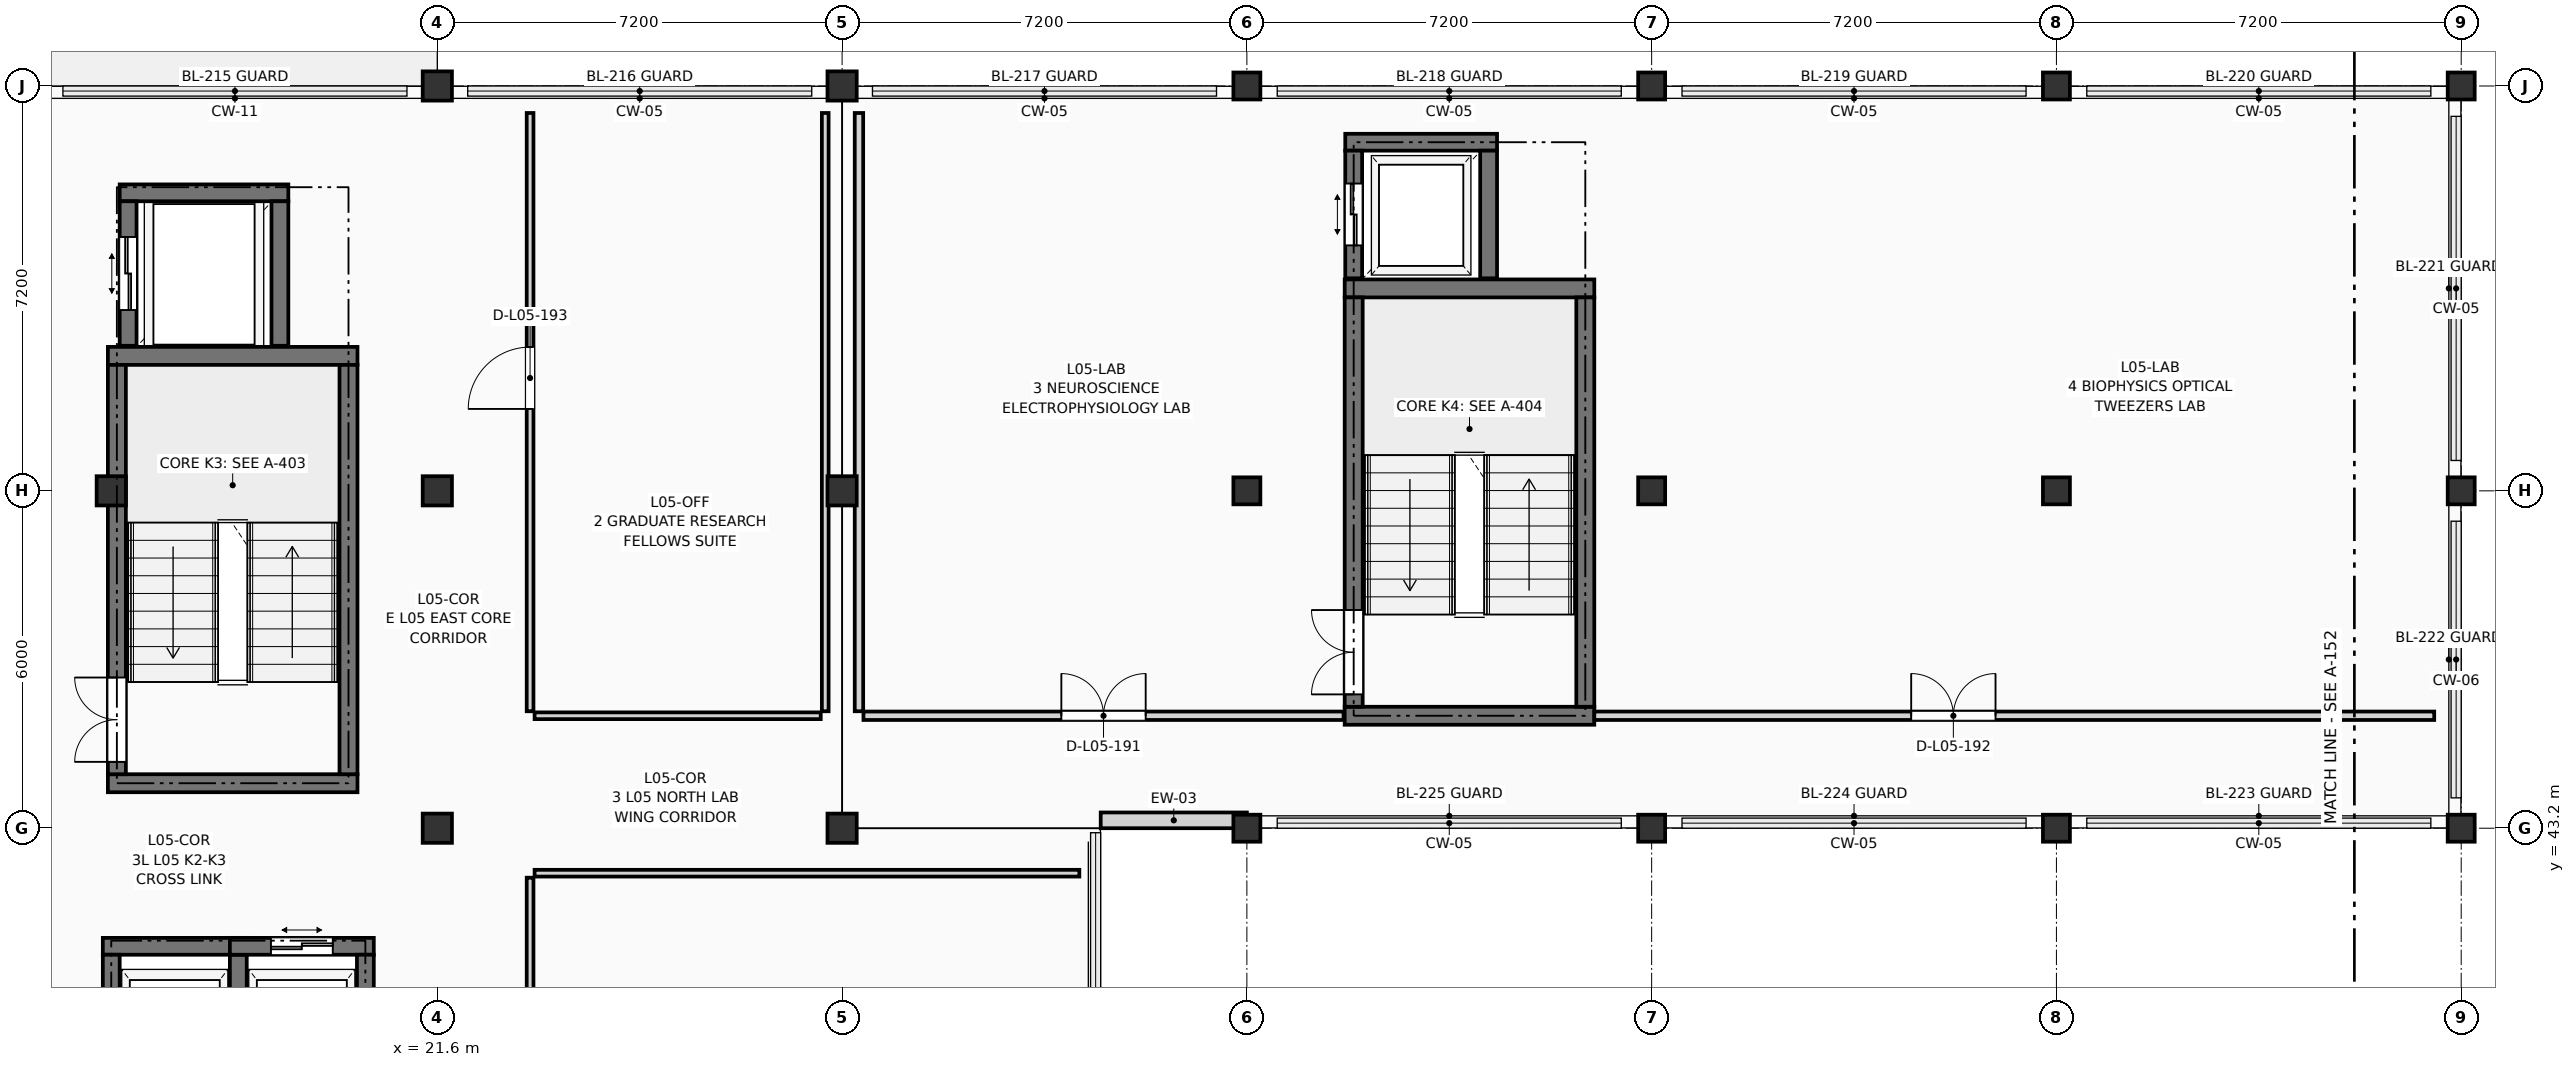
"""IFC4 building model, lengths in metres.
Left out: names, types, materials, properties, quantities, classifications, styles, units other than length and angle.
Written with IfcOpenShell. Run it as: python <this file> out.ifc"""

import sys

from ifc_helpers import new_model, si_unit, direction, frame, frame_2d, origin, origin_2d, place, context, subcontext, project, spatial, rectangle, extrude, element, fill, save


model = new_model("IFC4")
c1 = context("Model", 3, precision=1e-05, world=origin(), true_north=direction((0.0, 1.0)))
c2 = subcontext(c1, "Body", "Model", "MODEL_VIEW")
j1 = project(units=[si_unit("LENGTHUNIT", "METRE"), si_unit("PLANEANGLEUNIT", "RADIAN")], contexts=[c1])
p1 = place(None, origin())
s1 = spatial("IfcSite", under=j1, at=p1, CompositionType="ELEMENT")
p2 = place(p1, origin())
s2 = spatial("IfcBuilding", under=s1, at=p2, CompositionType="ELEMENT")
p3 = place(p2, frame((0.0, 0.0, 19.35)))
s3 = spatial("IfcBuildingStorey", under=s2, at=p3, CompositionType="ELEMENT", Elevation=19.35)
for number, where, z_axis, x_axis in (
    (1, (15.8, 49.2, 0.0), (0.0, 0.0, 1.0), (1.0, 0.0, 0.0)),
    (2, (21.6, 43.2, 0.0), (0.0, 0.0, 1.0), (1.0, 0.0, 0.0)),
    (3, (21.6, 49.2, 0.0), (0.0, 0.0, 1.0), (1.0, 0.0, 0.0)),
    (4, (21.6, 56.4, 0.0), (0.0, 0.0, 1.0), (1.0, 0.0, 0.0)),
    (5, (28.8, 43.2, 0.0), (0.0, 0.0, 1.0), (1.0, 0.0, 0.0)),
    (6, (28.8, 49.2, 0.0), (0.0, 0.0, 1.0), (1.0, 0.0, 0.0)),
    (7, (28.8, 56.4, 0.0), (0.0, 0.0, 1.0), (1.0, 0.0, 0.0)),
):
    element("IfcColumn", number, at=place(p3, frame(where, z_axis=z_axis, x_axis=x_axis)), inside=s3, PredefinedType="COLUMN", context=c2, shape_type="SweptSolid", body=[
        extrude(rectangle(XDim=0.52, YDim=0.52, at=origin_2d()), origin(), (0.0, 0.0, 1.0), 3.6),
    ])
for number, where, z_axis, x_axis in (
    (8, (36.0, 43.2, 0.0), (0.0, 0.0, 1.0), (1.0, 0.0, 0.0)),
    (9, (36.0, 49.2, 0.0), (0.0, 0.0, 1.0), (1.0, 0.0, 0.0)),
    (10, (36.0, 56.4, 0.0), (0.0, 0.0, 1.0), (1.0, 0.0, 0.0)),
    (11, (43.2, 43.2, 0.0), (0.0, 0.0, 1.0), (1.0, 0.0, 0.0)),
    (12, (43.2, 49.2, 0.0), (0.0, 0.0, 1.0), (1.0, 0.0, 0.0)),
    (13, (43.2, 56.4, 0.0), (0.0, 0.0, 1.0), (1.0, 0.0, 0.0)),
    (14, (50.4, 43.2, 0.0), (0.0, 0.0, 1.0), (1.0, 0.0, 0.0)),
    (15, (50.4, 49.2, 0.0), (0.0, 0.0, 1.0), (1.0, 0.0, 0.0)),
    (16, (50.4, 56.4, 0.0), (0.0, 0.0, 1.0), (1.0, 0.0, 0.0)),
    (17, (57.6, 43.2, 0.0), (0.0, 0.0, 1.0), (1.0, 0.0, 0.0)),
    (18, (57.6, 49.2, 0.0), (0.0, 0.0, 1.0), (1.0, 0.0, 0.0)),
    (19, (57.6, 56.4, 0.0), (0.0, 0.0, 1.0), (1.0, 0.0, 0.0)),
):
    element("IfcColumn", number, at=place(p3, frame(where, z_axis=z_axis, x_axis=x_axis)), inside=s3, PredefinedType="COLUMN", context=c2, shape_type="SweptSolid", body=[
        extrude(rectangle(XDim=0.48, YDim=0.48, at=origin_2d()), origin(), (0.0, 0.0, 1.0), 3.6),
    ])
p4 = place(p3, frame((33.4, 43.34, 0.0), z_axis=(0.0, 0.0, 1.0), x_axis=(1.0, 0.0, 0.0)))
e20 = element("IfcWall", 20, at=p4, inside=s3, PredefinedType="SOLIDWALL", context=c2, shape_type="SweptSolid", body=[
    extrude(rectangle(XDim=2.6, YDim=0.28, at=frame_2d((1.3, 0.0))), origin(), (0.0, 0.0, 1.0), 3.38),
])
for number, where, z_axis, x_axis in (
    (21, (15.74, 44.0, 0.0), (0.0, 0.0, 1.0), (1.0, 0.0, 0.0)),
    (22, (15.74, 51.6, 0.0), (0.0, 0.0, 1.0), (1.0, 0.0, 0.0)),
):
    element("IfcWall", number, at=place(p3, frame(where, z_axis=z_axis, x_axis=x_axis)), inside=s3, PredefinedType="SHEAR", context=c2, shape_type="SweptSolid", body=[
        extrude(rectangle(XDim=4.44, YDim=0.32, at=frame_2d((2.22, 0.0))), origin(), (0.0, 0.0, 1.0), 3.39),
    ])
p5 = place(p3, frame((15.9, 44.16, 0.0), z_axis=(0.0, 0.0, 1.0), x_axis=(0.0, 1.0, 0.0)))
e23 = element("IfcWall", 23, at=p5, inside=s3, PredefinedType="SHEAR", context=c2, shape_type="SweptSolid", body=[
    extrude(rectangle(XDim=7.28, YDim=0.32, at=frame_2d((3.64, 0.0))), origin(), (0.0, 0.0, 1.0), 3.39),
])
p6 = place(p5, frame((0.22, 0.0, 0.0)))
e24 = element("IfcOpeningElement", 24, at=p6, cuts=e23, PredefinedType="OPENING", context=c2, shape_type="SweptSolid", body=[
    extrude(rectangle(XDim=1.5, YDim=2.2, at=frame_2d((0.75, 1.1))), frame((0.0, 0.172, 0.0), z_axis=(0.0, -1.0, 0.0), x_axis=(1.0, 0.0, 0.0)), (0.0, 0.0, 1.0), 0.344),
])
p7 = place(p3, frame((20.02, 44.16, 0.0), z_axis=(0.0, 0.0, 1.0), x_axis=(0.0, 1.0, 0.0)))
e25 = element("IfcWall", 25, at=p7, inside=s3, PredefinedType="SHEAR", context=c2, shape_type="SweptSolid", body=[
    extrude(rectangle(XDim=7.28, YDim=0.32, at=frame_2d((3.64, 0.0))), origin(), (0.0, 0.0, 1.0), 3.39),
])
for number, where, z_axis, x_axis in (
    (26, (37.74, 45.2, 0.0), (0.0, 0.0, 1.0), (1.0, 0.0, 0.0)),
    (27, (37.74, 52.8, 0.0), (0.0, 0.0, 1.0), (1.0, 0.0, 0.0)),
):
    element("IfcWall", number, at=place(p3, frame(where, z_axis=z_axis, x_axis=x_axis)), inside=s3, PredefinedType="SHEAR", context=c2, shape_type="SweptSolid", body=[
        extrude(rectangle(XDim=4.44, YDim=0.32, at=frame_2d((2.22, 0.0))), origin(), (0.0, 0.0, 1.0), 3.39),
    ])
p8 = place(p3, frame((37.9, 45.36, 0.0), z_axis=(0.0, 0.0, 1.0), x_axis=(0.0, 1.0, 0.0)))
e28 = element("IfcWall", 28, at=p8, inside=s3, PredefinedType="SHEAR", context=c2, shape_type="SweptSolid", body=[
    extrude(rectangle(XDim=7.28, YDim=0.32, at=frame_2d((3.64, 0.0))), origin(), (0.0, 0.0, 1.0), 3.39),
])
p9 = place(p8, frame((0.22, 0.0, 0.0)))
e29 = element("IfcOpeningElement", 29, at=p9, cuts=e28, PredefinedType="OPENING", context=c2, shape_type="SweptSolid", body=[
    extrude(rectangle(XDim=1.5, YDim=2.2, at=frame_2d((0.75, 1.1))), frame((0.0, 0.172, 0.0), z_axis=(0.0, -1.0, 0.0), x_axis=(1.0, 0.0, 0.0)), (0.0, 0.0, 1.0), 0.344),
])
p10 = place(p3, frame((42.02, 45.36, 0.0), z_axis=(0.0, 0.0, 1.0), x_axis=(0.0, 1.0, 0.0)))
e30 = element("IfcWall", 30, at=p10, inside=s3, PredefinedType="SHEAR", context=c2, shape_type="SweptSolid", body=[
    extrude(rectangle(XDim=7.28, YDim=0.32, at=frame_2d((3.64, 0.0))), origin(), (0.0, 0.0, 1.0), 3.39),
])
p11 = place(p3, frame((15.65, 41.1, 0.0), z_axis=(0.0, 0.0, 1.0), x_axis=(1.0, 0.0, 0.0)))
e31 = element("IfcWall", 31, at=p11, inside=s3, PredefinedType="SHEAR", context=c2, shape_type="SweptSolid", body=[
    extrude(rectangle(XDim=2.56, YDim=0.3, at=frame_2d((1.28, 0.0))), origin(), (0.0, 0.0, 1.0), 3.39),
])
p12 = place(p3, frame((15.8, 37.98, 0.0), z_axis=(0.0, 0.0, 1.0), x_axis=(0.0, 1.0, 0.0)))
e32 = element("IfcWall", 32, at=p12, inside=s3, PredefinedType="SHEAR", context=c2, shape_type="SweptSolid", body=[
    extrude(rectangle(XDim=2.97, YDim=0.3, at=frame_2d((1.485, 0.0))), origin(), (0.0, 0.0, 1.0), 3.39),
])
p13 = place(p12, frame((0.935, 0.0, 0.0)))
e33 = element("IfcOpeningElement", 33, at=p13, cuts=e32, PredefinedType="OPENING", context=c2, shape_type="SweptSolid", body=[
    extrude(rectangle(XDim=1.1, YDim=2.2, at=frame_2d((0.55, 1.1))), frame((0.0, 0.162, 0.0), z_axis=(0.0, -1.0, 0.0), x_axis=(1.0, 0.0, 0.0)), (0.0, 0.0, 1.0), 0.324),
])
p14 = place(p3, frame((18.06, 37.98, 0.0), z_axis=(0.0, 0.0, 1.0), x_axis=(0.0, 1.0, 0.0)))
e34 = element("IfcWall", 34, at=p14, inside=s3, PredefinedType="SHEAR", context=c2, shape_type="SweptSolid", body=[
    extrude(rectangle(XDim=2.97, YDim=0.3, at=frame_2d((1.485, 0.0))), origin(), (0.0, 0.0, 1.0), 3.39),
])
p15 = place(p3, frame((17.91, 41.1, 0.0), z_axis=(0.0, 0.0, 1.0), x_axis=(1.0, 0.0, 0.0)))
e35 = element("IfcWall", 35, at=p15, inside=s3, PredefinedType="SHEAR", context=c2, shape_type="SweptSolid", body=[
    extrude(rectangle(XDim=2.56, YDim=0.3, at=frame_2d((1.28, 0.0))), origin(), (0.0, 0.0, 1.0), 3.39),
])
p16 = place(p15, frame((0.73, 0.0, 0.0)))
e36 = element("IfcOpeningElement", 36, at=p16, cuts=e35, PredefinedType="OPENING", context=c2, shape_type="SweptSolid", body=[
    extrude(rectangle(XDim=1.1, YDim=2.2, at=frame_2d((0.55, 1.1))), frame((0.0, 0.162, 0.0), z_axis=(0.0, -1.0, 0.0), x_axis=(1.0, 0.0, 0.0)), (0.0, 0.0, 1.0), 0.324),
])
p17 = place(p3, frame((20.32, 37.98, 0.0), z_axis=(0.0, 0.0, 1.0), x_axis=(0.0, 1.0, 0.0)))
e37 = element("IfcWall", 37, at=p17, inside=s3, PredefinedType="SHEAR", context=c2, shape_type="SweptSolid", body=[
    extrude(rectangle(XDim=2.97, YDim=0.3, at=frame_2d((1.485, 0.0))), origin(), (0.0, 0.0, 1.0), 3.39),
])
p18 = place(p3, frame((37.75, 55.4, 0.0), z_axis=(0.0, 0.0, 1.0), x_axis=(1.0, 0.0, 0.0)))
e38 = element("IfcWall", 38, at=p18, inside=s3, PredefinedType="SHEAR", context=c2, shape_type="SweptSolid", body=[
    extrude(rectangle(XDim=2.7, YDim=0.3, at=frame_2d((1.35, 0.0))), origin(), (0.0, 0.0, 1.0), 3.39),
])
p19 = place(p3, frame((37.9, 52.98, 0.0), z_axis=(0.0, 0.0, 1.0), x_axis=(0.0, 1.0, 0.0)))
e39 = element("IfcWall", 39, at=p19, inside=s3, PredefinedType="SHEAR", context=c2, shape_type="SweptSolid", body=[
    extrude(rectangle(XDim=2.27, YDim=0.3, at=frame_2d((1.135, 0.0))), origin(), (0.0, 0.0, 1.0), 3.39),
])
p20 = place(p19, frame((0.585, 0.0, 0.0)))
e40 = element("IfcOpeningElement", 40, at=p20, cuts=e39, PredefinedType="OPENING", context=c2, shape_type="SweptSolid", body=[
    extrude(rectangle(XDim=1.1, YDim=2.2, at=frame_2d((0.55, 1.1))), frame((0.0, 0.162, 0.0), z_axis=(0.0, -1.0, 0.0), x_axis=(1.0, 0.0, 0.0)), (0.0, 0.0, 1.0), 0.324),
])
p21 = place(p3, frame((40.3, 52.98, 0.0), z_axis=(0.0, 0.0, 1.0), x_axis=(0.0, 1.0, 0.0)))
e41 = element("IfcWall", 41, at=p21, inside=s3, PredefinedType="SHEAR", context=c2, shape_type="SweptSolid", body=[
    extrude(rectangle(XDim=2.27, YDim=0.3, at=frame_2d((1.135, 0.0))), origin(), (0.0, 0.0, 1.0), 3.39),
])
p22 = place(p3, frame((15.95, 54.5, 0.0), z_axis=(0.0, 0.0, 1.0), x_axis=(1.0, 0.0, 0.0)))
e42 = element("IfcWall", 42, at=p22, inside=s3, PredefinedType="SHEAR", context=c2, shape_type="SweptSolid", body=[
    extrude(rectangle(XDim=3.0, YDim=0.3, at=frame_2d((1.5, 0.0))), origin(), (0.0, 0.0, 1.0), 3.39),
])
p23 = place(p3, frame((16.1, 51.78, 0.0), z_axis=(0.0, 0.0, 1.0), x_axis=(0.0, 1.0, 0.0)))
e43 = element("IfcWall", 43, at=p23, inside=s3, PredefinedType="SHEAR", context=c2, shape_type="SweptSolid", body=[
    extrude(rectangle(XDim=2.57, YDim=0.3, at=frame_2d((1.285, 0.0))), origin(), (0.0, 0.0, 1.0), 3.39),
])
p24 = place(p23, frame((0.635, 0.0, 0.0)))
e44 = element("IfcOpeningElement", 44, at=p24, cuts=e43, PredefinedType="OPENING", context=c2, shape_type="SweptSolid", body=[
    extrude(rectangle(XDim=1.3, YDim=2.25, at=frame_2d((0.65, 1.125))), frame((0.0, 0.162, 0.0), z_axis=(0.0, -1.0, 0.0), x_axis=(1.0, 0.0, 0.0)), (0.0, 0.0, 1.0), 0.324),
])
p25 = place(p3, frame((18.8, 51.78, 0.0), z_axis=(0.0, 0.0, 1.0), x_axis=(0.0, 1.0, 0.0)))
e45 = element("IfcWall", 45, at=p25, inside=s3, PredefinedType="SHEAR", context=c2, shape_type="SweptSolid", body=[
    extrude(rectangle(XDim=2.57, YDim=0.3, at=frame_2d((1.285, 0.0))), origin(), (0.0, 0.0, 1.0), 3.39),
])
p26 = place(p3, frame((23.25, 28.98, 0.0), z_axis=(0.0, 0.0, 1.0), x_axis=(0.0, 1.0, 0.0)))
e46 = element("IfcWall", 46, at=p26, inside=s3, PredefinedType="PARTITIONING", context=c2, shape_type="SweptSolid", body=[
    extrude(rectangle(XDim=13.34, YDim=0.12, at=frame_2d((6.67, 0.0))), origin(), (0.0, 0.0, 1.0), 3.375),
])
p27 = place(p26, frame((4.364, 0.0, 0.0)))
e47 = element("IfcOpeningElement", 47, at=p27, cuts=e46, PredefinedType="OPENING", context=c2, shape_type="SweptSolid", body=[
    extrude(rectangle(XDim=1.2, YDim=2.15, at=frame_2d((0.6, 1.075))), frame((0.0, 0.072, 0.0), z_axis=(0.0, -1.0, 0.0), x_axis=(1.0, 0.0, 0.0)), (0.0, 0.0, 1.0), 0.144),
])
p28 = place(p3, frame((23.33, 42.4, 0.0), z_axis=(0.0, 0.0, 1.0), x_axis=(1.0, 0.0, 0.0)))
e48 = element("IfcWall", 48, at=p28, inside=s3, PredefinedType="PARTITIONING", context=c2, shape_type="SweptSolid", body=[
    extrude(rectangle(XDim=9.69, YDim=0.12, at=frame_2d((4.845, 0.0))), origin(), (0.0, 0.0, 1.0), 3.375),
])
p29 = place(p3, frame((29.1, 45.28, 0.0), z_axis=(0.0, 0.0, 1.0), x_axis=(0.0, 1.0, 0.0)))
e49 = element("IfcWall", 49, at=p29, inside=s3, PredefinedType="PARTITIONING", context=c2, shape_type="SweptSolid", body=[
    extrude(rectangle(XDim=10.64, YDim=0.15, at=frame_2d((5.32, 0.0))), origin(), (0.0, 0.0, 1.0), 2.715),
])
p30 = place(p3, frame((29.18, 45.2, 0.0), z_axis=(0.0, 0.0, 1.0), x_axis=(1.0, 0.0, 0.0)))
e50 = element("IfcWall", 50, at=p30, inside=s3, PredefinedType="PARTITIONING", context=c2, shape_type="SweptSolid", body=[
    extrude(rectangle(XDim=8.54, YDim=0.15, at=frame_2d((4.27, 0.0))), origin(), (0.0, 0.0, 1.0), 3.375),
])
p31 = place(p30, frame((3.52, 0.0, 0.0)))
e51 = element("IfcOpeningElement", 51, at=p31, cuts=e50, PredefinedType="OPENING", context=c2, shape_type="SweptSolid", body=[
    extrude(rectangle(XDim=1.5, YDim=2.2, at=frame_2d((0.75, 1.1))), frame((0.0, 0.087, 0.0), z_axis=(0.0, -1.0, 0.0), x_axis=(1.0, 0.0, 0.0)), (0.0, 0.0, 1.0), 0.174),
])
p32 = place(p3, frame((42.18, 45.2, 0.0), z_axis=(0.0, 0.0, 1.0), x_axis=(1.0, 0.0, 0.0)))
e52 = element("IfcWall", 52, at=p32, inside=s3, PredefinedType="PARTITIONING", context=c2, shape_type="SweptSolid", body=[
    extrude(rectangle(XDim=14.94, YDim=0.15, at=frame_2d((7.47, 0.0))), origin(), (0.0, 0.0, 1.0), 3.375),
])
p33 = place(p32, frame((5.637, 0.0, 0.0)))
e53 = element("IfcOpeningElement", 53, at=p33, cuts=e52, PredefinedType="OPENING", context=c2, shape_type="SweptSolid", body=[
    extrude(rectangle(XDim=1.5, YDim=2.2, at=frame_2d((0.75, 1.1))), frame((0.0, 0.087, 0.0), z_axis=(0.0, -1.0, 0.0), x_axis=(1.0, 0.0, 0.0)), (0.0, 0.0, 1.0), 0.174),
])
p34 = place(p3, frame((23.25, 45.28, 0.0), z_axis=(0.0, 0.0, 1.0), x_axis=(0.0, 1.0, 0.0)))
e54 = element("IfcWall", 54, at=p34, inside=s3, PredefinedType="PARTITIONING", context=c2, shape_type="SweptSolid", body=[
    extrude(rectangle(XDim=10.64, YDim=0.12, at=frame_2d((5.32, 0.0))), origin(), (0.0, 0.0, 1.0), 3.375),
])
p35 = place(p34, frame((5.377, 0.0, 0.0)))
e55 = element("IfcOpeningElement", 55, at=p35, cuts=e54, PredefinedType="OPENING", context=c2, shape_type="SweptSolid", body=[
    extrude(rectangle(XDim=1.1, YDim=2.15, at=frame_2d((0.55, 1.075))), frame((0.0, 0.072, 0.0), z_axis=(0.0, -1.0, 0.0), x_axis=(1.0, 0.0, 0.0)), (0.0, 0.0, 1.0), 0.144),
])
p36 = place(p3, frame((23.33, 45.2, 0.0), z_axis=(0.0, 0.0, 1.0), x_axis=(1.0, 0.0, 0.0)))
e56 = element("IfcWall", 56, at=p36, inside=s3, PredefinedType="PARTITIONING", context=c2, shape_type="SweptSolid", body=[
    extrude(rectangle(XDim=5.09, YDim=0.12, at=frame_2d((2.545, 0.0))), origin(), (0.0, 0.0, 1.0), 3.375),
])
p37 = place(p3, frame((28.5, 45.28, 0.0), z_axis=(0.0, 0.0, 1.0), x_axis=(0.0, 1.0, 0.0)))
e57 = element("IfcWall", 57, at=p37, inside=s3, PredefinedType="PARTITIONING", context=c2, shape_type="SweptSolid", body=[
    extrude(rectangle(XDim=10.64, YDim=0.12, at=frame_2d((5.32, 0.0))), origin(), (0.0, 0.0, 1.0), 2.715),
])
p38 = place(p6, origin())
e58 = element("IfcDoor", 58, at=p38, inside=s3, OperationType="DOUBLE_DOOR_SINGLE_SWING", PredefinedType="DOOR", context=c2, shape_type="SweptSolid", body=[
    extrude(rectangle(XDim=1.5, YDim=2.2, at=frame_2d((0.75, 1.1))), frame((0.0, 0.025, 0.0), z_axis=(0.0, -1.0, 0.0), x_axis=(1.0, 0.0, 0.0)), (0.0, 0.0, 1.0), 0.05),
])
fill(e24, e58)
p39 = place(p9, origin())
e59 = element("IfcDoor", 59, at=p39, inside=s3, OperationType="DOUBLE_DOOR_SINGLE_SWING", PredefinedType="DOOR", context=c2, shape_type="SweptSolid", body=[
    extrude(rectangle(XDim=1.5, YDim=2.2, at=frame_2d((0.75, 1.1))), frame((0.0, 0.025, 0.0), z_axis=(0.0, -1.0, 0.0), x_axis=(1.0, 0.0, 0.0)), (0.0, 0.0, 1.0), 0.05),
])
fill(e29, e59)
p40 = place(p16, origin())
e60 = element("IfcDoor", 60, at=p40, inside=s3, OperationType="DOUBLE_DOOR_SLIDING", PredefinedType="DOOR", context=c2, shape_type="SweptSolid", body=[
    extrude(rectangle(XDim=1.1, YDim=2.2, at=frame_2d((0.55, 1.1))), frame((0.0, 0.025, 0.0), z_axis=(0.0, -1.0, 0.0), x_axis=(1.0, 0.0, 0.0)), (0.0, 0.0, 1.0), 0.05),
])
fill(e36, e60)
p41 = place(p20, origin())
e61 = element("IfcDoor", 61, at=p41, inside=s3, OperationType="DOUBLE_DOOR_SLIDING", PredefinedType="DOOR", context=c2, shape_type="SweptSolid", body=[
    extrude(rectangle(XDim=1.1, YDim=2.2, at=frame_2d((0.55, 1.1))), frame((0.0, 0.025, 0.0), z_axis=(0.0, -1.0, 0.0), x_axis=(1.0, 0.0, 0.0)), (0.0, 0.0, 1.0), 0.05),
])
fill(e40, e61)
p42 = place(p24, origin())
e62 = element("IfcDoor", 62, at=p42, inside=s3, OperationType="DOUBLE_DOOR_SLIDING", PredefinedType="DOOR", context=c2, shape_type="SweptSolid", body=[
    extrude(rectangle(XDim=1.3, YDim=2.25, at=frame_2d((0.65, 1.125))), frame((0.0, 0.025, 0.0), z_axis=(0.0, -1.0, 0.0), x_axis=(1.0, 0.0, 0.0)), (0.0, 0.0, 1.0), 0.05),
])
fill(e44, e62)
p43 = place(p31, origin())
e63 = element("IfcDoor", 63, at=p43, inside=s3, OperationType="DOUBLE_DOOR_SINGLE_SWING", PredefinedType="DOOR", context=c2, shape_type="SweptSolid", body=[
    extrude(rectangle(XDim=1.5, YDim=2.2, at=frame_2d((0.75, 1.1))), frame((0.0, 0.025, 0.0), z_axis=(0.0, -1.0, 0.0), x_axis=(1.0, 0.0, 0.0)), (0.0, 0.0, 1.0), 0.05),
])
fill(e51, e63)
p44 = place(p33, origin())
e64 = element("IfcDoor", 64, at=p44, inside=s3, OperationType="DOUBLE_DOOR_SINGLE_SWING", PredefinedType="DOOR", context=c2, shape_type="SweptSolid", body=[
    extrude(rectangle(XDim=1.5, YDim=2.2, at=frame_2d((0.75, 1.1))), frame((0.0, 0.025, 0.0), z_axis=(0.0, -1.0, 0.0), x_axis=(1.0, 0.0, 0.0)), (0.0, 0.0, 1.0), 0.05),
])
fill(e53, e64)
p45 = place(p35, origin())
e65 = element("IfcDoor", 65, at=p45, inside=s3, OperationType="SINGLE_SWING_LEFT", PredefinedType="DOOR", context=c2, shape_type="SweptSolid", body=[
    extrude(rectangle(XDim=1.1, YDim=2.15, at=frame_2d((0.55, 1.075))), frame((0.0, 0.025, 0.0), z_axis=(0.0, -1.0, 0.0), x_axis=(1.0, 0.0, 0.0)), (0.0, 0.0, 1.0), 0.05),
])
fill(e55, e65)
save(model, sys.argv[1])
